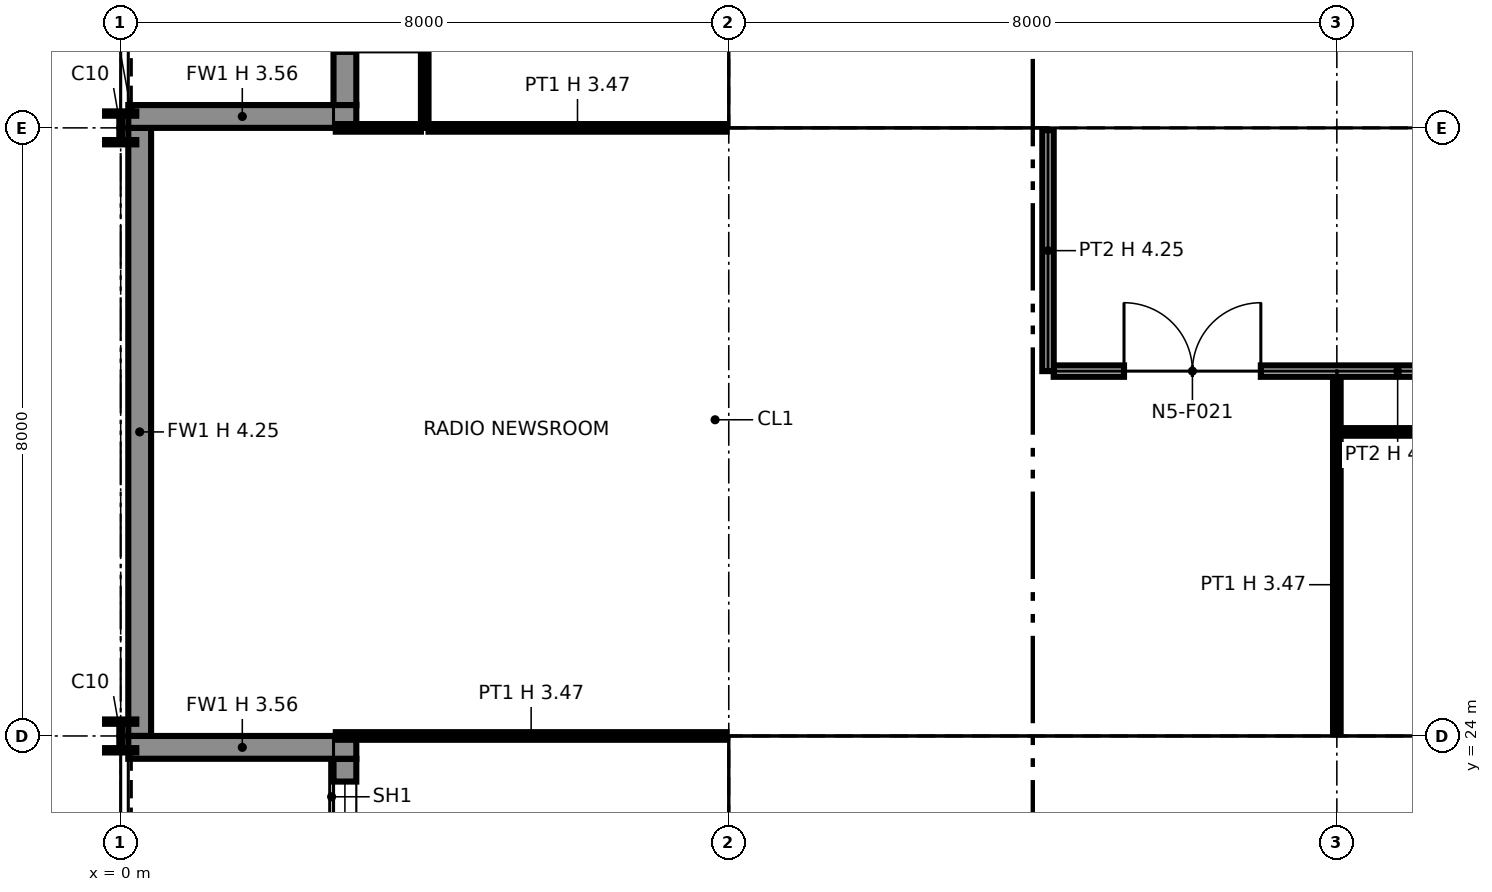
"""IFC4 building model, lengths in metres.
Left out: names, types, materials, properties, quantities, classifications, styles, units other than length and angle.
Written with IfcOpenShell. Run it as: python <this file> out.ifc"""

import sys

from ifc_helpers import new_model, si_unit, direction, frame, frame_2d, origin, origin_2d, place, context, subcontext, project, spatial, polyline, rectangle, i_section, outline, extrude, element, fill, save


model = new_model("IFC4")
c1 = context("Model", 3, precision=1e-05, world=origin(), true_north=direction((0.0, 1.0)))
c2 = subcontext(c1, "Body", "Model", "MODEL_VIEW")
j1 = project(units=[si_unit("LENGTHUNIT", "METRE"), si_unit("PLANEANGLEUNIT", "RADIAN")], contexts=[c1])
p1 = place(None, origin())
s1 = spatial("IfcSite", under=j1, at=p1, CompositionType="ELEMENT")
p2 = place(p1, origin())
s2 = spatial("IfcBuilding", under=s1, at=p2, CompositionType="ELEMENT")
p3 = place(p2, frame((0.0, 0.0, 87.6)))
s3 = spatial("IfcBuildingStorey", under=s2, at=p3, CompositionType="ELEMENT", Elevation=87.6)
for number, where, z_axis, x_axis in (
    (1, (0.0, 24.0, 0.0), (0.0, 0.0, 1.0), (1.0, 0.0, 0.0)),
    (2, (0.0, 32.0, 0.0), (0.0, 0.0, 1.0), (1.0, 0.0, 0.0)),
    (3, (8.0, 24.0, 0.0), (0.0, 0.0, 1.0), (1.0, 0.0, 0.0)),
):
    element("IfcColumn", number, at=place(p3, frame(where, z_axis=z_axis, x_axis=x_axis)), inside=s3, PredefinedType="COLUMN", context=c2, shape_type="SweptSolid", body=[
        extrude(i_section(OverallWidth=0.411, OverallDepth=0.434, WebThickness=0.036, FlangeThickness=0.057, at=origin_2d()), origin(), (0.0, 0.0, 1.0), 4.25),
    ])
p4 = place(p3, frame((8.0, 32.0, 0.0), z_axis=(0.0, 0.0, 1.0), x_axis=(1.0, 0.0, 0.0)))
e4 = element("IfcColumn", 4, at=p4, inside=s3, PredefinedType="COLUMN", context=c2, shape_type="SweptSolid", body=[
    extrude(i_section(OverallWidth=0.394, OverallDepth=0.376, WebThickness=0.017, FlangeThickness=0.028, at=origin_2d()), origin(), (0.0, 0.0, 1.0), 4.25),
])
p5 = place(p3, frame((16.0, 24.0, 0.0), z_axis=(0.0, 0.0, 1.0), x_axis=(1.0, 0.0, 0.0)))
e5 = element("IfcColumn", 5, at=p5, inside=s3, PredefinedType="COLUMN", context=c2, shape_type="SweptSolid", body=[
    extrude(i_section(OverallWidth=0.411, OverallDepth=0.434, WebThickness=0.036, FlangeThickness=0.057, at=origin_2d()), origin(), (0.0, 0.0, 1.0), 4.25),
])
p6 = place(p3, frame((16.0, 32.0, 0.0), z_axis=(0.0, 0.0, 1.0), x_axis=(1.0, 0.0, 0.0)))
e6 = element("IfcColumn", 6, at=p6, inside=s3, PredefinedType="COLUMN", context=c2, shape_type="SweptSolid", body=[
    extrude(i_section(OverallWidth=0.394, OverallDepth=0.376, WebThickness=0.017, FlangeThickness=0.028, at=origin_2d()), origin(), (0.0, 0.0, 1.0), 4.25),
])
p7 = place(p3, frame((2.95, 39.7, 0.0), z_axis=(0.0, 0.0, 1.0), x_axis=(0.0, -1.0, 0.0)))
e7 = element("IfcWall", 7, at=p7, inside=s3, PredefinedType="SOLIDWALL", context=c2, shape_type="SweptSolid", body=[
    extrude(rectangle(XDim=7.4, YDim=0.3, at=frame_2d((3.7, 0.0))), origin(), (0.0, 0.0, 1.0), 4.25),
])
p8 = place(p7, frame((0.3, 0.0, 0.9)))
e8 = element("IfcOpeningElement", 8, at=p8, cuts=e7, PredefinedType="OPENING", context=c2, shape_type="SweptSolid", body=[
    extrude(rectangle(XDim=2.8, YDim=2.2, at=frame_2d((1.4, 1.1))), frame((0.0, 0.16, 0.0), z_axis=(0.0, -1.0, 0.0), x_axis=(1.0, 0.0, 0.0)), (0.0, 0.0, 1.0), 0.32),
])
p9 = place(p7, frame((4.7, 0.0, 0.0)))
e9 = element("IfcOpeningElement", 9, at=p9, cuts=e7, PredefinedType="OPENING", context=c2, shape_type="SweptSolid", body=[
    extrude(rectangle(XDim=2.0, YDim=2.4, at=frame_2d((1.0, 1.2))), frame((0.0, 0.16, 0.0), z_axis=(0.0, -1.0, 0.0), x_axis=(1.0, 0.0, 0.0)), (0.0, 0.0, 1.0), 0.32),
])
p10 = place(p3, frame((0.1, 32.15, 0.0), z_axis=(0.0, 0.0, 1.0), x_axis=(1.0, 0.0, 0.0)))
e10 = element("IfcWall", 10, at=p10, inside=s3, PredefinedType="SOLIDWALL", context=c2, shape_type="SweptSolid", body=[
    extrude(rectangle(XDim=3.0, YDim=0.3, at=frame_2d((1.5, 0.0))), origin(), (0.0, 0.0, 1.0), 3.556),
])
p11 = place(p3, frame((0.25, 32.0, 0.0), z_axis=(0.0, 0.0, 1.0), x_axis=(0.0, -1.0, 0.0)))
e11 = element("IfcWall", 11, at=p11, inside=s3, PredefinedType="SOLIDWALL", context=c2, shape_type="SweptSolid", body=[
    extrude(rectangle(XDim=8.0, YDim=0.3, at=frame_2d((4.0, 0.0))), origin(), (0.0, 0.0, 1.0), 4.25),
])
p12 = place(p3, frame((2.95, 23.7, 0.0), z_axis=(0.0, 0.0, 1.0), x_axis=(0.0, -1.0, 0.0)))
e12 = element("IfcWall", 12, at=p12, inside=s3, PredefinedType="SOLIDWALL", context=c2, shape_type="SweptSolid", body=[
    extrude(rectangle(XDim=7.4, YDim=0.3, at=frame_2d((3.7, 0.0))), origin(), (0.0, 0.0, 1.0), 4.25),
])
p13 = place(p12, frame((0.3, 0.0, 0.9)))
e13 = element("IfcOpeningElement", 13, at=p13, cuts=e12, PredefinedType="OPENING", context=c2, shape_type="SweptSolid", body=[
    extrude(rectangle(XDim=2.8, YDim=2.2, at=frame_2d((1.4, 1.1))), frame((0.0, 0.16, 0.0), z_axis=(0.0, -1.0, 0.0), x_axis=(1.0, 0.0, 0.0)), (0.0, 0.0, 1.0), 0.32),
])
p14 = place(p12, frame((4.7, 0.0, 0.0)))
e14 = element("IfcOpeningElement", 14, at=p14, cuts=e12, PredefinedType="OPENING", context=c2, shape_type="SweptSolid", body=[
    extrude(rectangle(XDim=2.0, YDim=2.4, at=frame_2d((1.0, 1.2))), frame((0.0, 0.16, 0.0), z_axis=(0.0, -1.0, 0.0), x_axis=(1.0, 0.0, 0.0)), (0.0, 0.0, 1.0), 0.32),
])
p15 = place(p3, frame((0.1, 23.85, 0.0), z_axis=(0.0, 0.0, 1.0), x_axis=(1.0, 0.0, 0.0)))
e15 = element("IfcWall", 15, at=p15, inside=s3, PredefinedType="SOLIDWALL", context=c2, shape_type="SweptSolid", body=[
    extrude(rectangle(XDim=3.0, YDim=0.3, at=frame_2d((1.5, 0.0))), origin(), (0.0, 0.0, 1.0), 3.556),
])
p16 = place(p3, frame((8.75, 8.85, 0.0), z_axis=(0.0, 0.0, 1.0), x_axis=(0.0, 1.0, 0.0)))
e16 = element("IfcWall", 16, at=p16, inside=s3, PredefinedType="PARTITIONING", context=c2, shape_type="SweptSolid", body=[
    extrude(outline(polyline([(0.0, 0.0), (14.3, 0.0), (14.3, 4.25), (10.231, 4.25), (10.23, 3.789), (10.07, 3.789), (10.069, 4.25), (7.27, 4.25), (7.269, 3.632), (7.031, 3.632), (7.031, 4.25), (0.0, 4.25), (0.0, 0.0)])), frame((0.0, 0.1, 0.0), z_axis=(0.0, -1.0, 0.0), x_axis=(1.0, 0.0, 0.0)), (0.0, 0.0, 1.0), 0.2),
])
p17 = place(p16, frame((8.3, 0.0, 0.0)))
e17 = element("IfcOpeningElement", 17, at=p17, cuts=e16, PredefinedType="OPENING", context=c2, shape_type="SweptSolid", body=[
    extrude(rectangle(XDim=1.8, YDim=2.1, at=frame_2d((0.9, 1.05))), frame((0.0, 0.11, 0.0), z_axis=(0.0, -1.0, 0.0), x_axis=(1.0, 0.0, 0.0)), (0.0, 0.0, 1.0), 0.22),
])
p18 = place(p3, frame((8.65, 23.25, 0.0), z_axis=(0.0, 0.0, 1.0), x_axis=(1.0, 0.0, 0.0)))
e18 = element("IfcWall", 18, at=p18, inside=s3, PredefinedType="PARTITIONING", context=c2, shape_type="SweptSolid", body=[
    extrude(outline(polyline([(0.0, 0.0), (14.7, 0.0), (14.7, 4.25), (7.469, 4.25), (7.469, 3.632), (7.231, 3.632), (7.23, 4.25), (0.0, 4.25), (0.0, 0.0)])), frame((0.0, 0.1, 0.0), z_axis=(0.0, -1.0, 0.0), x_axis=(1.0, 0.0, 0.0)), (0.0, 0.0, 1.0), 0.2),
])
for number, where, z_axis, x_axis in (
    (19, (11.6, 20.0, 0.0), (0.0, 0.0, 1.0), (0.0, 1.0, 0.0)),
    (20, (14.3, 20.0, 0.0), (0.0, 0.0, 1.0), (0.0, 1.0, 0.0)),
):
    element("IfcWall", number, at=place(p3, frame(where, z_axis=z_axis, x_axis=x_axis)), inside=s3, PredefinedType="PARTITIONING", context=c2, shape_type="SweptSolid", body=[
        extrude(rectangle(XDim=3.15, YDim=0.2, at=frame_2d((1.575, 0.0))), origin(), (0.0, 0.0, 1.0), 4.25),
    ])
p19 = place(p3, frame((16.875, 20.0, 0.0), z_axis=(0.0, 0.0, 1.0), x_axis=(0.0, 1.0, 0.0)))
e21 = element("IfcWall", 21, at=p19, inside=s3, PredefinedType="PARTITIONING", context=c2, shape_type="SweptSolid", body=[
    extrude(outline(polyline([(0.0, 0.0), (3.15, 0.0), (3.15, 4.25), (0.082, 4.25), (0.081, 3.789), (0.0, 3.789), (0.0, 0.0)])), frame((0.0, 0.075, 0.0), z_axis=(0.0, -1.0, 0.0), x_axis=(1.0, 0.0, 0.0)), (0.0, 0.0, 1.0), 0.15),
])
p20 = place(p3, frame((8.65, 32.75, 0.0), z_axis=(0.0, 0.0, 1.0), x_axis=(1.0, 0.0, 0.0)))
e22 = element("IfcWall", 22, at=p20, inside=s3, PredefinedType="PARTITIONING", context=c2, shape_type="SweptSolid", body=[
    extrude(outline(polyline([(0.0, 0.0), (14.7, 0.0), (14.7, 4.25), (7.469, 4.25), (7.469, 3.632), (7.231, 3.632), (7.23, 4.25), (0.0, 4.25), (0.0, 0.0)])), frame((0.0, 0.1, 0.0), z_axis=(0.0, -1.0, 0.0), x_axis=(1.0, 0.0, 0.0)), (0.0, 0.0, 1.0), 0.2),
])
p21 = place(p20, frame((4.05, 0.0, 0.0)))
e23 = element("IfcOpeningElement", 23, at=p21, cuts=e22, PredefinedType="OPENING", context=c2, shape_type="SweptSolid", body=[
    extrude(rectangle(XDim=1.8, YDim=2.1, at=frame_2d((0.9, 1.05))), frame((0.0, 0.11, 0.0), z_axis=(0.0, -1.0, 0.0), x_axis=(1.0, 0.0, 0.0)), (0.0, 0.0, 1.0), 0.22),
])
p22 = place(p20, frame((8.35, 0.0, 0.0)))
e24 = element("IfcOpeningElement", 24, at=p22, cuts=e22, PredefinedType="OPENING", context=c2, shape_type="SweptSolid", body=[
    extrude(rectangle(XDim=1.4, YDim=2.1, at=frame_2d((0.7, 1.05))), frame((0.0, 0.11, 0.0), z_axis=(0.0, -1.0, 0.0), x_axis=(1.0, 0.0, 0.0)), (0.0, 0.0, 1.0), 0.22),
])
p23 = place(p20, frame((10.85, 0.0, 0.0)))
e25 = element("IfcOpeningElement", 25, at=p23, cuts=e22, PredefinedType="OPENING", context=c2, shape_type="SweptSolid", body=[
    extrude(rectangle(XDim=1.4, YDim=2.1, at=frame_2d((0.7, 1.05))), frame((0.0, 0.11, 0.0), z_axis=(0.0, -1.0, 0.0), x_axis=(1.0, 0.0, 0.0)), (0.0, 0.0, 1.0), 0.22),
])
p24 = place(p3, frame((8.75, 32.85, 0.0), z_axis=(0.0, 0.0, 1.0), x_axis=(0.0, 1.0, 0.0)))
e26 = element("IfcWall", 26, at=p24, inside=s3, PredefinedType="PARTITIONING", context=c2, shape_type="SweptSolid", body=[
    extrude(outline(polyline([(0.0, 0.0), (6.3, 0.0), (6.3, 4.25), (3.231, 4.25), (3.23, 3.789), (3.07, 3.789), (3.069, 4.25), (0.0, 4.25), (0.0, 0.0)])), frame((0.0, 0.1, 0.0), z_axis=(0.0, -1.0, 0.0), x_axis=(1.0, 0.0, 0.0)), (0.0, 0.0, 1.0), 0.2),
])
p25 = place(p3, frame((16.0, 32.85, 0.0), z_axis=(0.0, 0.0, 1.0), x_axis=(0.0, 1.0, 0.0)))
e27 = element("IfcWall", 27, at=p25, inside=s3, PredefinedType="PARTITIONING", context=c2, shape_type="SweptSolid", body=[
    extrude(rectangle(XDim=3.15, YDim=0.6, at=frame_2d((1.575, 0.0))), origin(), (0.0, 0.0, 1.0), 3.632),
])
p26 = place(p3, frame((2.83, 24.0, 0.0), z_axis=(0.0, 0.0, 1.0), x_axis=(1.0, 0.0, 0.0)))
e28 = element("IfcWall", 28, at=p26, inside=s3, PredefinedType="PARTITIONING", context=c2, shape_type="SweptSolid", body=[
    extrude(rectangle(XDim=5.14, YDim=0.1, at=frame_2d((2.57, 0.0))), origin(), (0.0, 0.0, 1.0), 3.47),
])
p27 = place(p3, frame((16.0, 24.03, 0.0), z_axis=(0.0, 0.0, 1.0), x_axis=(0.0, 1.0, 0.0)))
e29 = element("IfcWall", 29, at=p27, inside=s3, PredefinedType="PARTITIONING", context=c2, shape_type="SweptSolid", body=[
    extrude(rectangle(XDim=3.92, YDim=0.1, at=frame_2d((1.96, 0.0))), origin(), (0.0, 0.0, 1.0), 3.47),
])
p28 = place(p3, frame((16.05, 28.0, 0.0), z_axis=(0.0, 0.0, 1.0), x_axis=(1.0, 0.0, 0.0)))
e30 = element("IfcWall", 30, at=p28, inside=s3, PredefinedType="PARTITIONING", context=c2, shape_type="SweptSolid", body=[
    extrude(rectangle(XDim=4.45, YDim=0.1, at=frame_2d((2.225, 0.0))), origin(), (0.0, 0.0, 1.0), 3.47),
])
p29 = place(p3, frame((16.0, 28.0, 0.0), z_axis=(0.0, 0.0, 1.0), x_axis=(0.0, 1.0, 0.0)))
e31 = element("IfcWall", 31, at=p29, inside=s3, PredefinedType="PARTITIONING", context=c2, shape_type="SweptSolid", body=[
    extrude(rectangle(XDim=0.725, YDim=0.1, at=frame_2d((0.363, 0.0))), origin(), (0.0, 0.0, 1.0), 3.47),
])
p30 = place(p3, frame((12.275, 28.8, 0.0), z_axis=(0.0, 0.0, 1.0), x_axis=(1.0, 0.0, 0.0)))
e32 = element("IfcWall", 32, at=p30, inside=s3, PredefinedType="PARTITIONING", context=c2, shape_type="SweptSolid", body=[
    extrude(rectangle(XDim=9.05, YDim=0.15, at=frame_2d((4.525, 0.0))), origin(), (0.0, 0.0, 1.0), 4.25),
])
p31 = place(p30, frame((0.925, 0.0, 0.0)))
e33 = element("IfcOpeningElement", 33, at=p31, cuts=e32, PredefinedType="OPENING", context=c2, shape_type="SweptSolid", body=[
    extrude(rectangle(XDim=1.8, YDim=2.1, at=frame_2d((0.9, 1.05))), frame((0.0, 0.085, 0.0), z_axis=(0.0, -1.0, 0.0), x_axis=(1.0, 0.0, 0.0)), (0.0, 0.0, 1.0), 0.17),
])
p32 = place(p3, frame((12.2, 28.8, 0.0), z_axis=(0.0, 0.0, 1.0), x_axis=(0.0, 1.0, 0.0)))
e34 = element("IfcWall", 34, at=p32, inside=s3, PredefinedType="PARTITIONING", context=c2, shape_type="SweptSolid", body=[
    extrude(rectangle(XDim=3.17, YDim=0.15, at=frame_2d((1.585, 0.0))), origin(), (0.0, 0.0, 1.0), 4.25),
])
p33 = place(p3, frame((2.83, 32.0, 0.0), z_axis=(0.0, 0.0, 1.0), x_axis=(1.0, 0.0, 0.0)))
e35 = element("IfcWall", 35, at=p33, inside=s3, PredefinedType="PARTITIONING", context=c2, shape_type="SweptSolid", body=[
    extrude(rectangle(XDim=1.12, YDim=0.1, at=frame_2d((0.56, 0.0))), origin(), (0.0, 0.0, 1.0), 3.47),
])
p34 = place(p3, frame((4.05, 32.0, 0.0), z_axis=(0.0, 0.0, 1.0), x_axis=(1.0, 0.0, 0.0)))
e36 = element("IfcWall", 36, at=p34, inside=s3, PredefinedType="PARTITIONING", context=c2, shape_type="SweptSolid", body=[
    extrude(rectangle(XDim=3.92, YDim=0.1, at=frame_2d((1.96, 0.0))), origin(), (0.0, 0.0, 1.0), 3.47),
])
p35 = place(p3, frame((4.0, 32.0, 0.0), z_axis=(0.0, 0.0, 1.0), x_axis=(0.0, 1.0, 0.0)))
e37 = element("IfcWall", 37, at=p35, inside=s3, PredefinedType="PARTITIONING", context=c2, shape_type="SweptSolid", body=[
    extrude(outline(polyline([(0.0, 0.0), (11.87, 0.0), (11.87, 4.25), (8.3, 4.25), (8.298, 3.47), (7.702, 3.47), (7.7, 4.25), (4.3, 4.25), (4.298, 3.47), (3.702, 3.47), (3.7, 4.25), (0.0, 4.25), (0.0, 0.0)])), frame((0.0, 0.05, 0.0), z_axis=(0.0, -1.0, 0.0), x_axis=(1.0, 0.0, 0.0)), (0.0, 0.0, 1.0), 0.1),
])
p36 = place(p35, frame((5.45, 0.0, 0.0)))
e38 = element("IfcOpeningElement", 38, at=p36, cuts=e37, PredefinedType="OPENING", context=c2, shape_type="SweptSolid", body=[
    extrude(rectangle(XDim=1.0, YDim=2.1, at=frame_2d((0.5, 1.05))), frame((0.0, 0.06, 0.0), z_axis=(0.0, -1.0, 0.0), x_axis=(1.0, 0.0, 0.0)), (0.0, 0.0, 1.0), 0.12),
])
p37 = place(p13, origin())
e39 = element("IfcWindow", 39, at=p37, inside=s3, PartitioningType="SINGLE_PANEL", PredefinedType="WINDOW", context=c2, shape_type="SweptSolid", body=[
    extrude(rectangle(XDim=2.8, YDim=2.2, at=frame_2d((1.4, 1.1))), frame((0.0, 0.03, 0.0), z_axis=(0.0, -1.0, 0.0), x_axis=(1.0, 0.0, 0.0)), (0.0, 0.0, 1.0), 0.06),
])
fill(e13, e39)
p38 = place(p21, origin())
e40 = element("IfcDoor", 40, at=p38, inside=s3, OperationType="DOUBLE_DOOR_SINGLE_SWING", PredefinedType="NOTDEFINED", context=c2, shape_type="SweptSolid", body=[
    extrude(rectangle(XDim=1.8, YDim=2.1, at=frame_2d((0.9, 1.05))), frame((0.0, 0.025, 0.0), z_axis=(0.0, -1.0, 0.0), x_axis=(1.0, 0.0, 0.0)), (0.0, 0.0, 1.0), 0.05),
])
fill(e23, e40)
p39 = place(p31, origin())
e41 = element("IfcDoor", 41, at=p39, inside=s3, OperationType="DOUBLE_DOOR_SINGLE_SWING", PredefinedType="DOOR", context=c2, shape_type="SweptSolid", body=[
    extrude(rectangle(XDim=1.8, YDim=2.1, at=frame_2d((0.9, 1.05))), frame((0.0, 0.025, 0.0), z_axis=(0.0, -1.0, 0.0), x_axis=(1.0, 0.0, 0.0)), (0.0, 0.0, 1.0), 0.05),
])
fill(e33, e41)
save(model, sys.argv[1])
